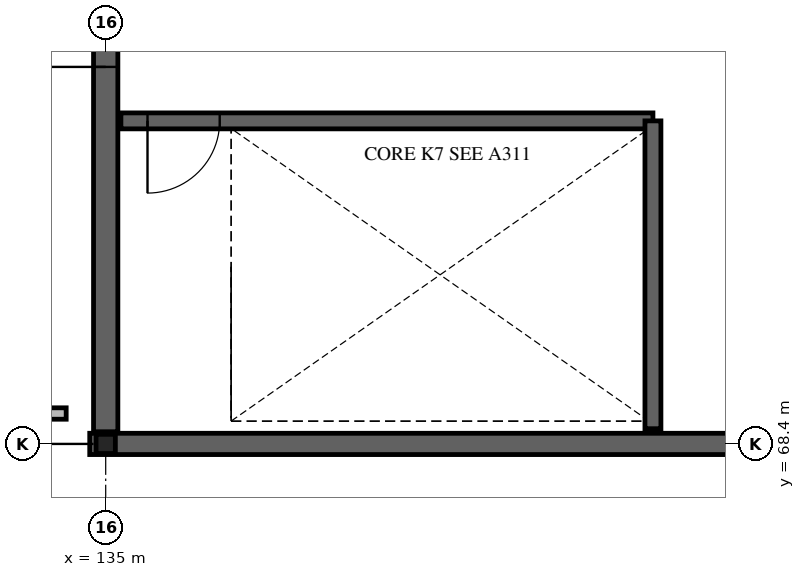
"""IFC4 building model, lengths in metres.
Left out: names, types, materials, properties, quantities, classifications, styles, units other than length and angle.
Written with IfcOpenShell. Run it as: python <this file> out.ifc"""

import sys

from ifc_helpers import new_model, si_unit, direction, frame, frame_2d, origin, origin_2d, place, context, subcontext, project, spatial, rectangle, i_section, extrude, element, fill, save


model = new_model("IFC4")
c1 = context("Model", 3, precision=1e-05, world=origin(), true_north=direction((0.0, 1.0)))
c2 = subcontext(c1, "Body", "Model", "MODEL_VIEW")
j1 = project(units=[si_unit("LENGTHUNIT", "METRE"), si_unit("PLANEANGLEUNIT", "RADIAN")], contexts=[c1])
p1 = place(None, origin())
s1 = spatial("IfcSite", under=j1, at=p1, CompositionType="ELEMENT")
p2 = place(p1, origin())
s2 = spatial("IfcBuilding", under=s1, at=p2, CompositionType="ELEMENT")
p3 = place(p2, frame((0.0, 0.0, 18.0)))
s3 = spatial("IfcBuildingStorey", under=s2, at=p3, CompositionType="ELEMENT", Elevation=18.0)
p4 = place(p3, frame((135.0, 68.4, 0.0), z_axis=(0.0, 0.0, 1.0), x_axis=(1.0, 0.0, 0.0)))
e1 = element("IfcColumn", 1, at=p4, inside=s3, PredefinedType="COLUMN", context=c2, shape_type="SweptSolid", body=[
    extrude(i_section(OverallWidth=0.254, OverallDepth=0.253, WebThickness=0.009, FlangeThickness=0.014, FilletRadius=0.012, at=origin_2d()), origin(), (0.0, 0.0, 1.0), 4.32),
])
p5 = place(p3, frame((134.79, 68.4, 0.0), z_axis=(0.0, 0.0, 1.0), x_axis=(1.0, 0.0, 0.0)))
e2 = element("IfcWall", 2, at=p5, inside=s3, PredefinedType="SOLIDWALL", context=c2, shape_type="SweptSolid", body=[
    extrude(rectangle(XDim=9.21, YDim=0.28, at=frame_2d((4.605, 0.0))), origin(), (0.0, 0.0, 1.0), 4.06),
])
p6 = place(p3, frame((135.0, 68.56, 0.0), z_axis=(0.0, 0.0, 1.0), x_axis=(0.0, 1.0, 0.0)))
e3 = element("IfcWall", 3, at=p6, inside=s3, PredefinedType="SHEAR", context=c2, shape_type="SweptSolid", body=[
    extrude(rectangle(XDim=7.28, YDim=0.32, at=frame_2d((3.64, 0.0))), origin(), (0.0, 0.0, 1.0), 4.04),
])
p7 = place(p6, frame((4.8, 0.0, 0.0)))
e4 = element("IfcOpeningElement", 4, at=p7, cuts=e3, PredefinedType="OPENING", context=c2, shape_type="SweptSolid", body=[
    extrude(rectangle(XDim=1.0, YDim=2.15, at=frame_2d((0.5, 1.075))), frame((0.0, 0.17, 0.0), z_axis=(0.0, -1.0, 0.0), x_axis=(1.0, 0.0, 0.0)), (0.0, 0.0, 1.0), 0.34),
])
p8 = place(p3, frame((135.2, 72.65, 0.0), z_axis=(0.0, 0.0, 1.0), x_axis=(1.0, 0.0, 0.0)))
e5 = element("IfcWall", 5, at=p8, inside=s3, PredefinedType="SOLIDWALL", context=c2, shape_type="SweptSolid", body=[
    extrude(rectangle(XDim=7.0, YDim=0.21, at=frame_2d((3.5, 0.0))), origin(), (0.0, 0.0, 1.0), 4.04),
])
p9 = place(p8, frame((0.35, 0.0, 0.0)))
e6 = element("IfcOpeningElement", 6, at=p9, cuts=e5, PredefinedType="OPENING", context=c2, shape_type="SweptSolid", body=[
    extrude(rectangle(XDim=0.95, YDim=2.12, at=frame_2d((0.475, 1.06))), frame((0.0, 0.115, 0.0), z_axis=(0.0, -1.0, 0.0), x_axis=(1.0, 0.0, 0.0)), (0.0, 0.0, 1.0), 0.23),
])
p10 = place(p3, frame((142.2, 68.6, 0.0), z_axis=(0.0, 0.0, 1.0), x_axis=(0.0, 1.0, 0.0)))
e7 = element("IfcWall", 7, at=p10, inside=s3, PredefinedType="SOLIDWALL", context=c2, shape_type="SweptSolid", body=[
    extrude(rectangle(XDim=4.05, YDim=0.21, at=frame_2d((2.025, 0.0))), origin(), (0.0, 0.0, 1.0), 4.04),
])
p11 = place(p3, frame((126.12, 68.8, 0.0), z_axis=(0.0, 0.0, 1.0), x_axis=(1.0, 0.0, 0.0)))
e8 = element("IfcWall", 8, at=p11, inside=s3, PredefinedType="PARTITIONING", context=c2, shape_type="SweptSolid", body=[
    extrude(rectangle(XDim=8.36, YDim=0.15, at=frame_2d((4.18, 0.0))), origin(), (0.0, 0.0, 1.0), 4.04),
])
p12 = place(p9, origin())
e9 = element("IfcDoor", 9, at=p12, inside=s3, OperationType="SINGLE_SWING_RIGHT", PredefinedType="DOOR", context=c2, shape_type="SweptSolid", body=[
    extrude(rectangle(XDim=0.95, YDim=2.12, at=frame_2d((0.475, 1.06))), frame((0.0, 0.025, 0.0), z_axis=(0.0, -1.0, 0.0), x_axis=(1.0, 0.0, 0.0)), (0.0, 0.0, 1.0), 0.05),
])
fill(e6, e9)
p13 = place(p7, origin())
e10 = element("IfcDoor", 10, at=p13, inside=s3, OperationType="SINGLE_SWING_LEFT", PredefinedType="DOOR", context=c2, shape_type="SweptSolid", body=[
    extrude(rectangle(XDim=1.0, YDim=2.15, at=frame_2d((0.5, 1.075))), frame((0.0, 0.025, 0.0), z_axis=(0.0, -1.0, 0.0), x_axis=(1.0, 0.0, 0.0)), (0.0, 0.0, 1.0), 0.05),
])
fill(e4, e10)
save(model, sys.argv[1])
